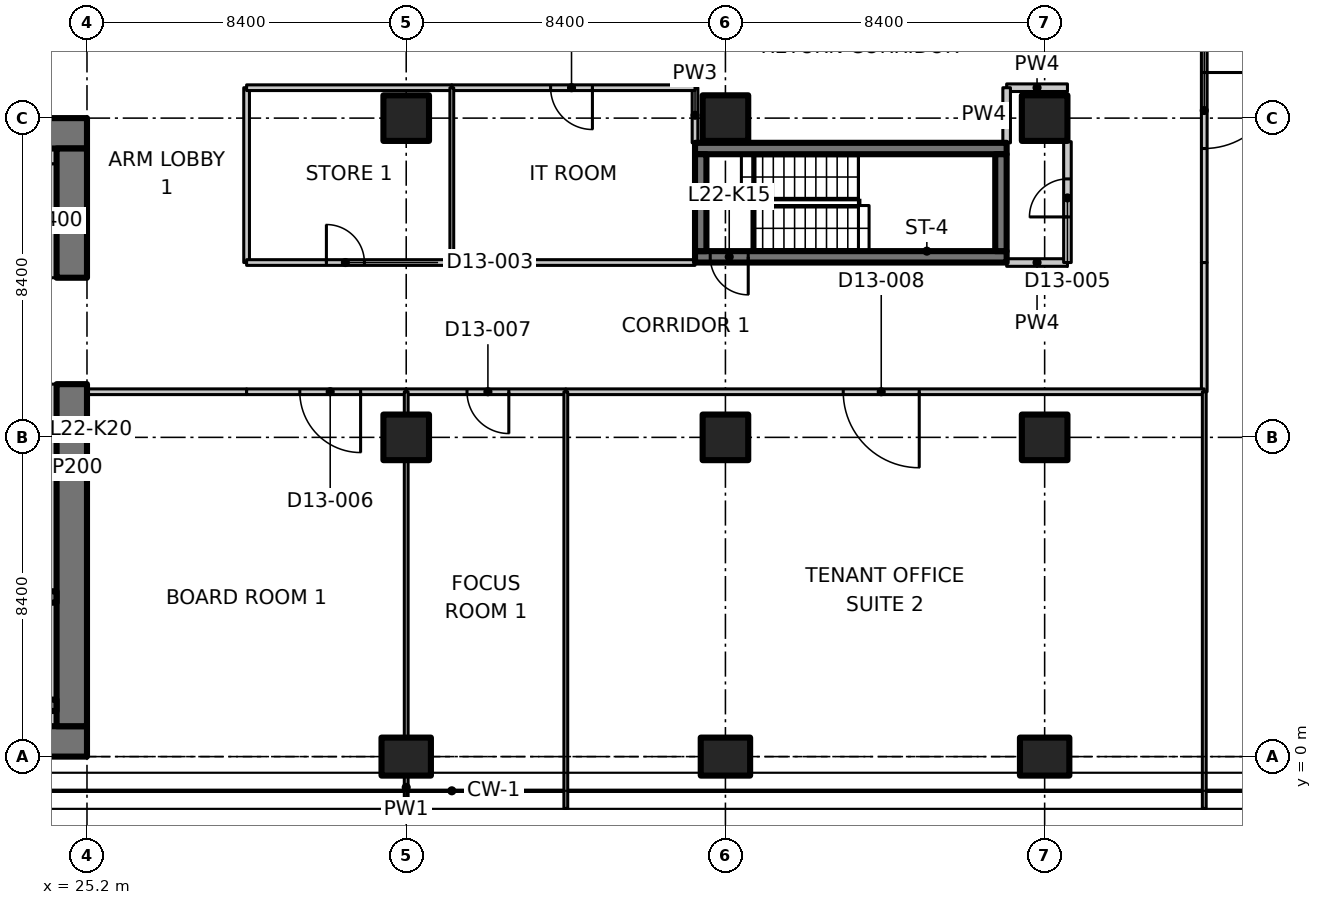
"""IFC4 building model, lengths in metres.
Left out: names, types, materials, properties, quantities, classifications, styles, units other than length and angle.
Written with IfcOpenShell. Run it as: python <this file> out.ifc"""

import sys

from ifc_helpers import new_model, si_unit, direction, frame, frame_2d, origin, origin_2d, place, context, subcontext, project, spatial, polyline, rectangle, outline, extrude, element, fill, save


model = new_model("IFC4")
c1 = context("Model", 3, precision=1e-05, world=origin(), true_north=direction((0.0, 1.0)))
c2 = subcontext(c1, "Body", "Model", "MODEL_VIEW")
j1 = project(units=[si_unit("LENGTHUNIT", "METRE"), si_unit("PLANEANGLEUNIT", "RADIAN")], contexts=[c1])
p1 = place(None, origin())
s1 = spatial("IfcSite", under=j1, at=p1, CompositionType="ELEMENT")
p2 = place(p1, origin())
s2 = spatial("IfcBuilding", under=s1, at=p2, CompositionType="ELEMENT")
p3 = place(p2, frame((0.0, 0.0, 95.3)))
s3 = spatial("IfcBuildingStorey", under=s2, at=p3, CompositionType="ELEMENT", Elevation=95.3)
p4 = place(p3, frame((33.6, 0.0, 0.0), z_axis=(0.0, 0.0, 1.0), x_axis=(0.0, 1.0, 0.0)))
e1 = element("IfcColumn", 1, at=p4, inside=s3, PredefinedType="COLUMN", context=c2, shape_type="SweptSolid", body=[
    extrude(rectangle(XDim=1.0, YDim=1.3, at=origin_2d()), origin(), (0.0, 0.0, 1.0), 3.35),
])
for number, where, z_axis, x_axis in (
    (2, (33.6, 8.4, 0.0), (0.0, 0.0, 1.0), (1.0, 0.0, 0.0)),
    (3, (33.6, 16.8, 0.0), (0.0, 0.0, 1.0), (1.0, 0.0, 0.0)),
):
    element("IfcColumn", number, at=place(p3, frame(where, z_axis=z_axis, x_axis=x_axis)), inside=s3, PredefinedType="COLUMN", context=c2, shape_type="SweptSolid", body=[
        extrude(rectangle(XDim=1.2, YDim=1.2, at=origin_2d()), origin(), (0.0, 0.0, 1.0), 3.35),
    ])
p5 = place(p3, frame((42.0, 0.0, 0.0), z_axis=(0.0, 0.0, 1.0), x_axis=(0.0, 1.0, 0.0)))
e4 = element("IfcColumn", 4, at=p5, inside=s3, PredefinedType="COLUMN", context=c2, shape_type="SweptSolid", body=[
    extrude(rectangle(XDim=1.0, YDim=1.3, at=origin_2d()), origin(), (0.0, 0.0, 1.0), 3.35),
])
for number, where, z_axis, x_axis in (
    (5, (42.0, 8.4, 0.0), (0.0, 0.0, 1.0), (1.0, 0.0, 0.0)),
    (6, (42.0, 16.8, 0.0), (0.0, 0.0, 1.0), (1.0, 0.0, 0.0)),
):
    element("IfcColumn", number, at=place(p3, frame(where, z_axis=z_axis, x_axis=x_axis)), inside=s3, PredefinedType="COLUMN", context=c2, shape_type="SweptSolid", body=[
        extrude(rectangle(XDim=1.2, YDim=1.2, at=origin_2d()), origin(), (0.0, 0.0, 1.0), 3.35),
    ])
p6 = place(p3, frame((50.4, 0.0, 0.0), z_axis=(0.0, 0.0, 1.0), x_axis=(0.0, 1.0, 0.0)))
e7 = element("IfcColumn", 7, at=p6, inside=s3, PredefinedType="COLUMN", context=c2, shape_type="SweptSolid", body=[
    extrude(rectangle(XDim=1.0, YDim=1.3, at=origin_2d()), origin(), (0.0, 0.0, 1.0), 3.35),
])
for number, where, z_axis, x_axis in (
    (8, (50.4, 8.4, 0.0), (0.0, 0.0, 1.0), (1.0, 0.0, 0.0)),
    (9, (50.4, 16.8, 0.0), (0.0, 0.0, 1.0), (1.0, 0.0, 0.0)),
):
    element("IfcColumn", number, at=place(p3, frame(where, z_axis=z_axis, x_axis=x_axis)), inside=s3, PredefinedType="COLUMN", context=c2, shape_type="SweptSolid", body=[
        extrude(rectangle(XDim=1.2, YDim=1.2, at=origin_2d()), origin(), (0.0, 0.0, 1.0), 3.35),
    ])
p7 = place(p3, frame((7.136, 0.4, 0.0), z_axis=(0.0, 0.0, 1.0), x_axis=(1.0, 0.0, 0.0)))
e10 = element("IfcWall", 10, at=p7, inside=s3, PredefinedType="SHEAR", context=c2, shape_type="SweptSolid", body=[
    extrude(rectangle(XDim=18.063, YDim=0.8, at=frame_2d((9.032, 0.0))), origin(), (0.0, 0.0, 1.0), 3.35),
])
p8 = place(p3, frame((23.8, 16.4, 0.0), z_axis=(0.0, 0.0, 1.0), x_axis=(1.0, 0.0, 0.0)))
e11 = element("IfcWall", 11, at=p8, inside=s3, PredefinedType="SHEAR", context=c2, shape_type="SweptSolid", body=[
    extrude(rectangle(XDim=1.4, YDim=0.8, at=frame_2d((0.7, 0.0))), origin(), (0.0, 0.0, 1.0), 3.35),
])
p9 = place(p3, frame((24.8, 0.8, 0.0), z_axis=(0.0, 0.0, 1.0), x_axis=(0.0, 1.0, 0.0)))
e12 = element("IfcWall", 12, at=p9, inside=s3, PredefinedType="SHEAR", context=c2, shape_type="SweptSolid", body=[
    extrude(rectangle(XDim=9.0, YDim=0.8, at=frame_2d((4.5, 0.0))), origin(), (0.0, 0.0, 1.0), 3.35),
])
p10 = place(p3, frame((24.8, 12.6, 0.0), z_axis=(0.0, 0.0, 1.0), x_axis=(0.0, 1.0, 0.0)))
e13 = element("IfcWall", 13, at=p10, inside=s3, PredefinedType="SHEAR", context=c2, shape_type="SweptSolid", body=[
    extrude(rectangle(XDim=3.4, YDim=0.8, at=frame_2d((1.7, 0.0))), origin(), (0.0, 0.0, 1.0), 3.35),
])
p11 = place(p3, frame((24.2, 12.6, 0.0), z_axis=(0.0, 0.0, 1.0), x_axis=(0.0, 1.0, 0.0)))
e14 = element("IfcWall", 14, at=p11, inside=s3, PredefinedType="PARTITIONING", context=c2, shape_type="SweptSolid", body=[
    extrude(rectangle(XDim=3.0, YDim=0.4, at=frame_2d((1.5, 0.0))), origin(), (0.0, 0.0, 1.0), 3.35),
])
p12 = place(p3, frame((23.8, 15.8, 0.0), z_axis=(0.0, 0.0, 1.0), x_axis=(1.0, 0.0, 0.0)))
e15 = element("IfcWall", 15, at=p12, inside=s3, PredefinedType="PARTITIONING", context=c2, shape_type="SweptSolid", body=[
    extrude(rectangle(XDim=0.6, YDim=0.4, at=frame_2d((0.3, 0.0))), origin(), (0.0, 0.0, 1.0), 3.35),
])
p13 = place(p3, frame((15.8, 1.35, 0.0), z_axis=(0.0, 0.0, 1.0), x_axis=(1.0, 0.0, 0.0)))
e16 = element("IfcWall", 16, at=p13, inside=s3, PredefinedType="SHEAR", context=c2, shape_type="SweptSolid", body=[
    extrude(rectangle(XDim=8.6, YDim=0.3, at=frame_2d((4.3, 0.0))), origin(), (0.0, 0.0, 1.0), 3.35),
])
p14 = place(p3, frame((15.8, 4.2, 0.0), z_axis=(0.0, 0.0, 1.0), x_axis=(1.0, 0.0, 0.0)))
e17 = element("IfcWall", 17, at=p14, inside=s3, PredefinedType="SHEAR", context=c2, shape_type="SweptSolid", body=[
    extrude(rectangle(XDim=8.6, YDim=0.3, at=frame_2d((4.3, 0.0))), origin(), (0.0, 0.0, 1.0), 3.35),
])
p15 = place(p14, frame((0.4, 0.0, 0.0)))
e18 = element("IfcOpeningElement", 18, at=p15, cuts=e17, PredefinedType="OPENING", context=c2, shape_type="SweptSolid", body=[
    extrude(rectangle(XDim=1.0, YDim=2.1, at=frame_2d((0.5, 1.05))), frame((0.0, 0.16, 0.0), z_axis=(0.0, -1.0, 0.0), x_axis=(1.0, 0.0, 0.0)), (0.0, 0.0, 1.0), 0.32),
])
p16 = place(p3, frame((49.4, 13.15, 0.0), z_axis=(0.0, 0.0, 1.0), x_axis=(-1.0, 0.0, 0.0)))
e19 = element("IfcWall", 19, at=p16, inside=s3, PredefinedType="SHEAR", context=c2, shape_type="SweptSolid", body=[
    extrude(rectangle(XDim=8.2, YDim=0.3, at=frame_2d((4.1, 0.0))), origin(), (0.0, 0.0, 1.0), 3.35),
])
p17 = place(p16, frame((6.8, 0.0, 0.0)))
e20 = element("IfcOpeningElement", 20, at=p17, cuts=e19, PredefinedType="OPENING", context=c2, shape_type="SweptSolid", body=[
    extrude(rectangle(XDim=1.0, YDim=2.1, at=frame_2d((0.5, 1.05))), frame((0.0, 0.16, 0.0), z_axis=(0.0, -1.0, 0.0), x_axis=(1.0, 0.0, 0.0)), (0.0, 0.0, 1.0), 0.32),
])
p18 = place(p3, frame((41.2, 16.0, 0.0), z_axis=(0.0, 0.0, 1.0), x_axis=(1.0, 0.0, 0.0)))
e21 = element("IfcWall", 21, at=p18, inside=s3, PredefinedType="SHEAR", context=c2, shape_type="SweptSolid", body=[
    extrude(rectangle(XDim=8.2, YDim=0.3, at=frame_2d((4.1, 0.0))), origin(), (0.0, 0.0, 1.0), 3.35),
])
for number, where, z_axis, x_axis in (
    (22, (41.35, 13.3, 0.0), (0.0, 0.0, 1.0), (0.0, 1.0, 0.0)),
    (23, (49.25, 13.3, 0.0), (0.0, 0.0, 1.0), (0.0, 1.0, 0.0)),
):
    element("IfcWall", number, at=place(p3, frame(where, z_axis=z_axis, x_axis=x_axis)), inside=s3, PredefinedType="SHEAR", context=c2, shape_type="SweptSolid", body=[
        extrude(rectangle(XDim=2.55, YDim=0.3, at=frame_2d((1.275, 0.0))), origin(), (0.0, 0.0, 1.0), 3.35),
    ])
p19 = place(p3, frame((13.35, 1.0, 0.0), z_axis=(0.0, 0.0, 1.0), x_axis=(1.0, 0.0, 0.0)))
e24 = element("IfcWall", 24, at=p19, inside=s3, PredefinedType="PARTITIONING", context=c2, shape_type="SweptSolid", body=[
    extrude(rectangle(XDim=11.05, YDim=0.4, at=frame_2d((5.525, 0.0))), origin(), (0.0, 0.0, 1.0), 3.35),
])
p20 = place(p3, frame((24.2, 1.5, 0.0), z_axis=(0.0, 0.0, 1.0), x_axis=(0.0, 1.0, 0.0)))
e25 = element("IfcWall", 25, at=p20, inside=s3, PredefinedType="PARTITIONING", context=c2, shape_type="SweptSolid", body=[
    extrude(rectangle(XDim=2.55, YDim=0.4, at=frame_2d((1.275, 0.0))), origin(), (0.0, 0.0, 1.0), 3.35),
])
p21 = place(p3, frame((24.2, 4.35, 0.0), z_axis=(0.0, 0.0, 1.0), x_axis=(0.0, 1.0, 0.0)))
e26 = element("IfcWall", 26, at=p21, inside=s3, PredefinedType="PARTITIONING", context=c2, shape_type="SweptSolid", body=[
    extrude(rectangle(XDim=5.45, YDim=0.4, at=frame_2d((2.725, 0.0))), origin(), (0.0, 0.0, 1.0), 3.35),
])
p22 = place(p3, frame((29.4, 17.6, 0.0), z_axis=(0.0, 0.0, 1.0), x_axis=(0.0, -1.0, 0.0)))
e27 = element("IfcWall", 27, at=p22, inside=s3, PredefinedType="PARTITIONING", context=c2, shape_type="SweptSolid", body=[
    extrude(rectangle(XDim=4.6, YDim=0.15, at=frame_2d((2.3, 0.0))), origin(), (0.0, 0.0, 1.0), 3.33),
])
p23 = place(p3, frame((29.4, 9.6, 0.0), z_axis=(0.0, 0.0, 1.0), x_axis=(-1.0, 0.0, 0.0)))
e28 = element("IfcWall", 28, at=p23, inside=s3, PredefinedType="PARTITIONING", context=c2, shape_type="SweptSolid", body=[
    extrude(rectangle(XDim=4.2, YDim=0.15, at=frame_2d((2.1, 0.0))), origin(), (0.0, 0.0, 1.0), 3.33),
])
p24 = place(p3, frame((54.6, 13.0, 0.0), z_axis=(0.0, 0.0, 1.0), x_axis=(0.0, -1.0, 0.0)))
e29 = element("IfcWall", 29, at=p24, inside=s3, PredefinedType="PARTITIONING", context=c2, shape_type="SweptSolid", body=[
    extrude(rectangle(XDim=3.4, YDim=0.15, at=frame_2d((1.7, 0.0))), origin(), (0.0, 0.0, 1.0), 3.33),
])
p25 = place(p3, frame((29.4, 13.0, 0.0), z_axis=(0.0, 0.0, 1.0), x_axis=(1.0, 0.0, 0.0)))
e30 = element("IfcWall", 30, at=p25, inside=s3, PredefinedType="PARTITIONING", context=c2, shape_type="SweptSolid", body=[
    extrude(rectangle(XDim=5.4, YDim=0.15, at=frame_2d((2.7, 0.0))), origin(), (0.0, 0.0, 1.0), 3.33),
])
p26 = place(p25, frame((2.1, 0.0, 0.0)))
e31 = element("IfcOpeningElement", 31, at=p26, cuts=e30, PredefinedType="OPENING", context=c2, shape_type="SweptSolid", body=[
    extrude(rectangle(XDim=1.0, YDim=2.1, at=frame_2d((0.5, 1.05))), frame((0.0, 0.085, 0.0), z_axis=(0.0, -1.0, 0.0), x_axis=(1.0, 0.0, 0.0)), (0.0, 0.0, 1.0), 0.17),
])
p27 = place(p3, frame((34.8, 13.0, 0.0), z_axis=(0.0, 0.0, 1.0), x_axis=(1.0, 0.0, 0.0)))
e32 = element("IfcWall", 32, at=p27, inside=s3, PredefinedType="PARTITIONING", context=c2, shape_type="SweptSolid", body=[
    extrude(rectangle(XDim=6.4, YDim=0.15, at=frame_2d((3.2, 0.0))), origin(), (0.0, 0.0, 1.0), 3.33),
])
p28 = place(p3, frame((49.4, 13.0, 0.0), z_axis=(0.0, 0.0, 1.0), x_axis=(1.0, 0.0, 0.0)))
e33 = element("IfcWall", 33, at=p28, inside=s3, PredefinedType="PARTITIONING", context=c2, shape_type="SweptSolid", body=[
    extrude(rectangle(XDim=1.6, YDim=0.2, at=frame_2d((0.8, 0.0))), origin(), (0.0, 0.0, 1.0), 3.33),
])
p29 = place(p3, frame((33.6, 9.6, 0.0), z_axis=(0.0, 0.0, 1.0), x_axis=(-1.0, 0.0, 0.0)))
e34 = element("IfcWall", 34, at=p29, inside=s3, PredefinedType="PARTITIONING", context=c2, shape_type="SweptSolid", body=[
    extrude(rectangle(XDim=4.2, YDim=0.15, at=frame_2d((2.1, 0.0))), origin(), (0.0, 0.0, 1.0), 3.33),
])
p30 = place(p29, frame((1.2, 0.0, 0.0)))
e35 = element("IfcOpeningElement", 35, at=p30, cuts=e34, PredefinedType="OPENING", context=c2, shape_type="SweptSolid", body=[
    extrude(rectangle(XDim=1.6, YDim=2.1, at=frame_2d((0.8, 1.05))), frame((0.0, 0.085, 0.0), z_axis=(0.0, -1.0, 0.0), x_axis=(1.0, 0.0, 0.0)), (0.0, 0.0, 1.0), 0.17),
])
p31 = place(p3, frame((37.8, 9.6, 0.0), z_axis=(0.0, 0.0, 1.0), x_axis=(-1.0, 0.0, 0.0)))
e36 = element("IfcWall", 36, at=p31, inside=s3, PredefinedType="PARTITIONING", context=c2, shape_type="SweptSolid", body=[
    extrude(rectangle(XDim=4.2, YDim=0.15, at=frame_2d((2.1, 0.0))), origin(), (0.0, 0.0, 1.0), 3.33),
])
p32 = place(p31, frame((1.5, 0.0, 0.0)))
e37 = element("IfcOpeningElement", 37, at=p32, cuts=e36, PredefinedType="OPENING", context=c2, shape_type="SweptSolid", body=[
    extrude(rectangle(XDim=1.1, YDim=2.1, at=frame_2d((0.55, 1.05))), frame((0.0, 0.085, 0.0), z_axis=(0.0, -1.0, 0.0), x_axis=(1.0, 0.0, 0.0)), (0.0, 0.0, 1.0), 0.17),
])
p33 = place(p3, frame((54.6, 9.6, 0.0), z_axis=(0.0, 0.0, 1.0), x_axis=(-1.0, 0.0, 0.0)))
e38 = element("IfcWall", 38, at=p33, inside=s3, PredefinedType="PARTITIONING", context=c2, shape_type="SweptSolid", body=[
    extrude(rectangle(XDim=16.8, YDim=0.15, at=frame_2d((8.4, 0.0))), origin(), (0.0, 0.0, 1.0), 3.33),
])
p34 = place(p33, frame((7.5, 0.0, 0.0)))
e39 = element("IfcOpeningElement", 39, at=p34, cuts=e38, PredefinedType="OPENING", context=c2, shape_type="SweptSolid", body=[
    extrude(rectangle(XDim=2.0, YDim=2.4, at=frame_2d((1.0, 1.2))), frame((0.0, 0.085, 0.0), z_axis=(0.0, -1.0, 0.0), x_axis=(1.0, 0.0, 0.0)), (0.0, 0.0, 1.0), 0.17),
])
p35 = place(p3, frame((54.6, 21.2, 0.0), z_axis=(0.0, 0.0, 1.0), x_axis=(0.0, -1.0, 0.0)))
e40 = element("IfcWall", 40, at=p35, inside=s3, PredefinedType="PARTITIONING", context=c2, shape_type="SweptSolid", body=[
    extrude(rectangle(XDim=8.2, YDim=0.15, at=frame_2d((4.1, 0.0))), origin(), (0.0, 0.0, 1.0), 3.33),
])
p36 = place(p35, frame((3.2, 0.0, 0.0)))
e41 = element("IfcOpeningElement", 41, at=p36, cuts=e40, PredefinedType="OPENING", context=c2, shape_type="SweptSolid", body=[
    extrude(rectangle(XDim=2.0, YDim=2.4, at=frame_2d((1.0, 1.2))), frame((0.0, 0.085, 0.0), z_axis=(0.0, -1.0, 0.0), x_axis=(1.0, 0.0, 0.0)), (0.0, 0.0, 1.0), 0.17),
])
p37 = place(p3, frame((54.6, -1.365, 0.0), z_axis=(0.0, 0.0, 1.0), x_axis=(0.0, 1.0, 0.0)))
e42 = element("IfcWall", 42, at=p37, inside=s3, PredefinedType="PARTITIONING", context=c2, shape_type="SweptSolid", body=[
    extrude(outline(polyline([(0.0, 0.0), (10.965, 0.0), (10.965, 3.33), (1.815, 3.33), (1.813, 2.98), (0.917, 2.98), (0.915, 3.33), (0.265, 3.33), (0.0, 3.33), (0.0, 0.0)])), frame((0.0, 0.05, 0.0), z_axis=(0.0, -1.0, 0.0), x_axis=(1.0, 0.0, 0.0)), (0.0, 0.0, 1.0), 0.1),
])
p38 = place(p3, frame((34.8, 17.6, 0.0), z_axis=(0.0, 0.0, 1.0), x_axis=(-1.0, 0.0, 0.0)))
e43 = element("IfcWall", 43, at=p38, inside=s3, PredefinedType="PARTITIONING", context=c2, shape_type="SweptSolid", body=[
    extrude(rectangle(XDim=5.4, YDim=0.15, at=frame_2d((2.7, 0.0))), origin(), (0.0, 0.0, 1.0), 3.33),
])
p39 = place(p3, frame((41.2, 16.15, 0.0), z_axis=(0.0, 0.0, 1.0), x_axis=(0.0, 1.0, 0.0)))
e44 = element("IfcWall", 44, at=p39, inside=s3, PredefinedType="PARTITIONING", context=c2, shape_type="SweptSolid", body=[
    extrude(rectangle(XDim=1.45, YDim=0.15, at=frame_2d((0.725, 0.0))), origin(), (0.0, 0.0, 1.0), 3.33),
])
p40 = place(p3, frame((41.2, 17.6, 0.0), z_axis=(0.0, 0.0, 1.0), x_axis=(-1.0, 0.0, 0.0)))
e45 = element("IfcWall", 45, at=p40, inside=s3, PredefinedType="PARTITIONING", context=c2, shape_type="SweptSolid", body=[
    extrude(rectangle(XDim=6.4, YDim=0.15, at=frame_2d((3.2, 0.0))), origin(), (0.0, 0.0, 1.0), 3.33),
])
p41 = place(p40, frame((2.7, 0.0, 0.0)))
e46 = element("IfcOpeningElement", 46, at=p41, cuts=e45, PredefinedType="OPENING", context=c2, shape_type="SweptSolid", body=[
    extrude(rectangle(XDim=1.1, YDim=2.1, at=frame_2d((0.55, 1.05))), frame((0.0, 0.085, 0.0), z_axis=(0.0, -1.0, 0.0), x_axis=(1.0, 0.0, 0.0)), (0.0, 0.0, 1.0), 0.17),
])
p42 = place(p3, frame((51.0, 17.6, 0.0), z_axis=(0.0, 0.0, 1.0), x_axis=(-1.0, 0.0, 0.0)))
e47 = element("IfcWall", 47, at=p42, inside=s3, PredefinedType="PARTITIONING", context=c2, shape_type="SweptSolid", body=[
    extrude(rectangle(XDim=1.6, YDim=0.2, at=frame_2d((0.8, 0.0))), origin(), (0.0, 0.0, 1.0), 3.33),
])
p43 = place(p3, frame((49.4, 17.6, 0.0), z_axis=(0.0, 0.0, 1.0), x_axis=(0.0, -1.0, 0.0)))
e48 = element("IfcWall", 48, at=p43, inside=s3, PredefinedType="PARTITIONING", context=c2, shape_type="SweptSolid", body=[
    extrude(rectangle(XDim=1.45, YDim=0.2, at=frame_2d((0.725, 0.0))), origin(), (0.0, 0.0, 1.0), 3.33),
])
p44 = place(p3, frame((51.0, 13.0, 0.0), z_axis=(0.0, 0.0, 1.0), x_axis=(0.0, 1.0, 0.0)))
e49 = element("IfcWall", 49, at=p44, inside=s3, PredefinedType="PARTITIONING", context=c2, shape_type="SweptSolid", body=[
    extrude(rectangle(XDim=3.18, YDim=0.2, at=frame_2d((1.59, 0.0))), origin(), (0.0, 0.0, 1.0), 3.33),
])
p45 = place(p44, frame((1.2, 0.0, 0.0)))
e50 = element("IfcOpeningElement", 50, at=p45, cuts=e49, PredefinedType="OPENING", context=c2, shape_type="SweptSolid", body=[
    extrude(rectangle(XDim=1.0, YDim=2.1, at=frame_2d((0.5, 1.05))), frame((0.0, 0.11, 0.0), z_axis=(0.0, -1.0, 0.0), x_axis=(1.0, 0.0, 0.0)), (0.0, 0.0, 1.0), 0.22),
])
p46 = place(p3, frame((34.8, 17.6, 0.0), z_axis=(0.0, 0.0, 1.0), x_axis=(0.0, -1.0, 0.0)))
e51 = element("IfcWall", 51, at=p46, inside=s3, PredefinedType="PARTITIONING", context=c2, shape_type="SweptSolid", body=[
    extrude(rectangle(XDim=4.6, YDim=0.1, at=frame_2d((2.3, 0.0))), origin(), (0.0, 0.0, 1.0), 3.33),
])
p47 = place(p3, frame((33.6, 9.6, 0.0), z_axis=(0.0, 0.0, 1.0), x_axis=(0.0, -1.0, 0.0)))
e52 = element("IfcWall", 52, at=p47, inside=s3, PredefinedType="PARTITIONING", context=c2, shape_type="SweptSolid", body=[
    extrude(rectangle(XDim=0.58, YDim=0.1, at=frame_2d((0.29, 0.0))), origin(), (0.0, 0.0, 1.0), 3.33),
])
p48 = place(p3, frame((33.6, 7.78, 0.0), z_axis=(0.0, 0.0, 1.0), x_axis=(0.0, -1.0, 0.0)))
e53 = element("IfcWall", 53, at=p48, inside=s3, PredefinedType="PARTITIONING", context=c2, shape_type="SweptSolid", body=[
    extrude(rectangle(XDim=7.26, YDim=0.1, at=frame_2d((3.63, 0.0))), origin(), (0.0, 0.0, 1.0), 3.33),
])
p49 = place(p3, frame((33.6, -0.52, 0.0), z_axis=(0.0, 0.0, 1.0), x_axis=(0.0, -1.0, 0.0)))
e54 = element("IfcWall", 54, at=p49, inside=s3, PredefinedType="PARTITIONING", context=c2, shape_type="SweptSolid", body=[
    extrude(rectangle(XDim=0.58, YDim=0.1, at=frame_2d((0.29, 0.0))), origin(), (0.0, 0.0, 1.0), 3.33),
])
p50 = place(p3, frame((37.8, 9.6, 0.0), z_axis=(0.0, 0.0, 1.0), x_axis=(0.0, -1.0, 0.0)))
e55 = element("IfcWall", 55, at=p50, inside=s3, PredefinedType="PARTITIONING", context=c2, shape_type="SweptSolid", body=[
    extrude(outline(polyline([(0.0, 0.0), (10.965, 0.0), (10.965, 3.33), (10.7, 3.33), (10.05, 3.33), (10.048, 2.98), (9.152, 2.98), (9.15, 3.33), (0.0, 3.33), (0.0, 0.0)])), frame((0.0, 0.05, 0.0), z_axis=(0.0, -1.0, 0.0), x_axis=(1.0, 0.0, 0.0)), (0.0, 0.0, 1.0), 0.1),
])
p51 = place(p17, origin())
e56 = element("IfcDoor", 56, at=p51, inside=s3, OperationType="SINGLE_SWING_RIGHT", PredefinedType="DOOR", context=c2, shape_type="SweptSolid", body=[
    extrude(rectangle(XDim=1.0, YDim=2.1, at=frame_2d((0.5, 1.05))), frame((0.0, 0.025, 0.0), z_axis=(0.0, -1.0, 0.0), x_axis=(1.0, 0.0, 0.0)), (0.0, 0.0, 1.0), 0.05),
])
fill(e20, e56)
p52 = place(p36, origin())
e57 = element("IfcDoor", 57, at=p52, inside=s3, OperationType="DOUBLE_DOOR_SINGLE_SWING", PredefinedType="DOOR", context=c2, shape_type="SweptSolid", body=[
    extrude(rectangle(XDim=2.0, YDim=2.4, at=frame_2d((1.0, 1.2))), frame((0.0, 0.025, 0.0), z_axis=(0.0, -1.0, 0.0), x_axis=(1.0, 0.0, 0.0)), (0.0, 0.0, 1.0), 0.05),
])
fill(e41, e57)
p53 = place(p26, origin())
e58 = element("IfcDoor", 58, at=p53, inside=s3, OperationType="SINGLE_SWING_LEFT", PredefinedType="DOOR", context=c2, shape_type="SweptSolid", body=[
    extrude(rectangle(XDim=1.0, YDim=2.1, at=frame_2d((0.5, 1.05))), frame((0.0, 0.025, 0.0), z_axis=(0.0, -1.0, 0.0), x_axis=(1.0, 0.0, 0.0)), (0.0, 0.0, 1.0), 0.05),
])
fill(e31, e58)
p54 = place(p41, origin())
e59 = element("IfcDoor", 59, at=p54, inside=s3, OperationType="SINGLE_SWING_LEFT", PredefinedType="DOOR", context=c2, shape_type="SweptSolid", body=[
    extrude(rectangle(XDim=1.1, YDim=2.1, at=frame_2d((0.55, 1.05))), frame((0.0, 0.025, 0.0), z_axis=(0.0, -1.0, 0.0), x_axis=(1.0, 0.0, 0.0)), (0.0, 0.0, 1.0), 0.05),
])
fill(e46, e59)
p55 = place(p45, origin())
e60 = element("IfcDoor", 60, at=p55, inside=s3, OperationType="SINGLE_SWING_LEFT", PredefinedType="DOOR", context=c2, shape_type="SweptSolid", body=[
    extrude(rectangle(XDim=1.0, YDim=2.1, at=frame_2d((0.5, 1.05))), frame((0.0, 0.025, 0.0), z_axis=(0.0, -1.0, 0.0), x_axis=(1.0, 0.0, 0.0)), (0.0, 0.0, 1.0), 0.05),
])
fill(e50, e60)
p56 = place(p30, origin())
e61 = element("IfcDoor", 61, at=p56, inside=s3, OperationType="DOUBLE_DOOR_SINGLE_SWING", PredefinedType="DOOR", context=c2, shape_type="SweptSolid", body=[
    extrude(rectangle(XDim=1.6, YDim=2.1, at=frame_2d((0.8, 1.05))), frame((0.0, 0.025, 0.0), z_axis=(0.0, -1.0, 0.0), x_axis=(1.0, 0.0, 0.0)), (0.0, 0.0, 1.0), 0.05),
])
fill(e35, e61)
p57 = place(p32, origin())
e62 = element("IfcDoor", 62, at=p57, inside=s3, OperationType="SINGLE_SWING_LEFT", PredefinedType="DOOR", context=c2, shape_type="SweptSolid", body=[
    extrude(rectangle(XDim=1.1, YDim=2.1, at=frame_2d((0.55, 1.05))), frame((0.0, 0.025, 0.0), z_axis=(0.0, -1.0, 0.0), x_axis=(1.0, 0.0, 0.0)), (0.0, 0.0, 1.0), 0.05),
])
fill(e37, e62)
p58 = place(p34, origin())
e63 = element("IfcDoor", 63, at=p58, inside=s3, OperationType="DOUBLE_DOOR_SINGLE_SWING", PredefinedType="DOOR", context=c2, shape_type="SweptSolid", body=[
    extrude(rectangle(XDim=2.0, YDim=2.4, at=frame_2d((1.0, 1.2))), frame((0.0, 0.025, 0.0), z_axis=(0.0, -1.0, 0.0), x_axis=(1.0, 0.0, 0.0)), (0.0, 0.0, 1.0), 0.05),
])
fill(e39, e63)
save(model, sys.argv[1])
